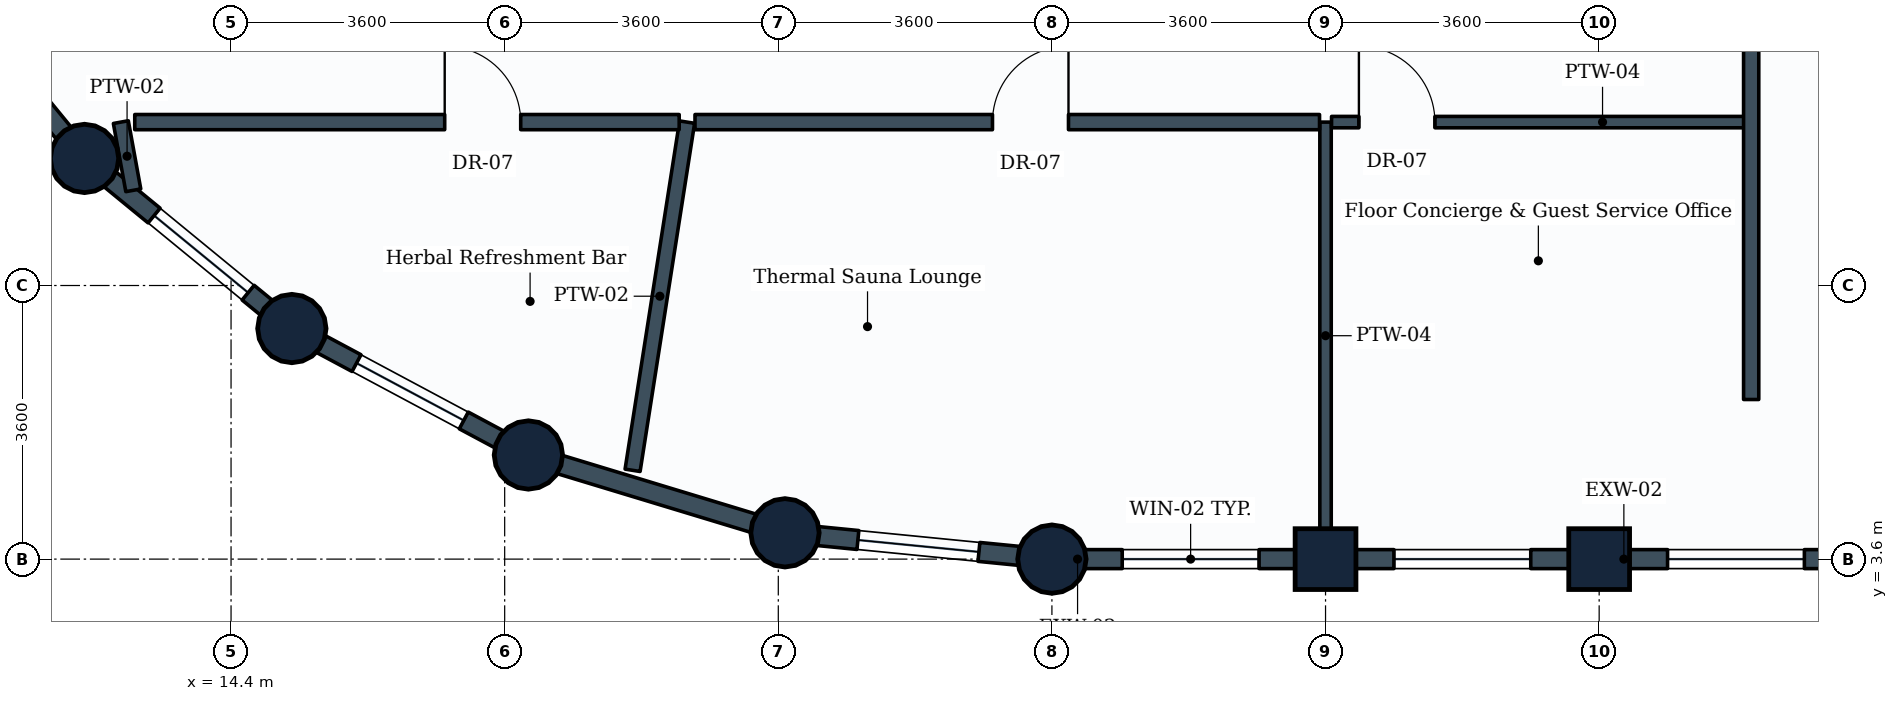
"""IFC4 building model, lengths in metres.
Left out: names, types, materials, properties, quantities, classifications, styles, units other than length and angle.
Written with IfcOpenShell. Run it as: python <this file> out.ifc"""

import sys

from ifc_helpers import new_model, si_unit, direction, frame, frame_2d, origin, origin_2d, place, context, subcontext, project, spatial, rectangle, circle, extrude, element, fill, save


model = new_model("IFC4")
c1 = context("Model", 3, precision=1e-05, world=origin(), true_north=direction((0.0, 1.0)))
c2 = subcontext(c1, "Body", "Model", "MODEL_VIEW")
j1 = project(units=[si_unit("LENGTHUNIT", "METRE"), si_unit("PLANEANGLEUNIT", "RADIAN")], contexts=[c1])
p1 = place(None, origin())
s1 = spatial("IfcSite", under=j1, at=p1, CompositionType="ELEMENT")
p2 = place(p1, origin())
s2 = spatial("IfcBuilding", under=s1, at=p2, CompositionType="ELEMENT")
p3 = place(p2, frame((0.0, 0.0, 242.6)))
s3 = spatial("IfcBuildingStorey", under=s2, at=p3, CompositionType="ELEMENT", Elevation=242.6)
for number, where, z_axis, x_axis in (
    (1, (12.472, 8.872, 0.0), (0.0, 0.0, 1.0), (1.0, 0.0, 0.0)),
    (2, (15.2, 6.634, 0.0), (0.0, 0.0, 1.0), (1.0, 0.0, 0.0)),
    (3, (18.312, 4.97, 0.0), (0.0, 0.0, 1.0), (1.0, 0.0, 0.0)),
    (4, (21.688, 3.946, 0.0), (0.0, 0.0, 1.0), (1.0, 0.0, 0.0)),
    (5, (25.2, 3.6, 0.0), (0.0, 0.0, 1.0), (1.0, 0.0, 0.0)),
):
    element("IfcColumn", number, at=place(p3, frame(where, z_axis=z_axis, x_axis=x_axis)), inside=s3, PredefinedType="COLUMN", context=c2, shape_type="SweptSolid", body=[
        extrude(circle(Radius=0.45, at=origin_2d()), origin(), (0.0, 0.0, 1.0), 3.6),
    ])
for number, where, z_axis, x_axis in (
    (6, (28.8, 3.6, 0.0), (0.0, 0.0, 1.0), (1.0, 0.0, 0.0)),
    (7, (32.4, 3.6, 0.0), (0.0, 0.0, 1.0), (1.0, 0.0, 0.0)),
):
    element("IfcColumn", number, at=place(p3, frame(where, z_axis=z_axis, x_axis=x_axis)), inside=s3, PredefinedType="COLUMN", context=c2, shape_type="SweptSolid", body=[
        extrude(rectangle(XDim=0.8, YDim=0.8, at=origin_2d()), origin(), (0.0, 0.0, 1.0), 3.6),
    ])
p4 = place(p3, frame((28.8, 3.6, 0.0), z_axis=(0.0, 0.0, 1.0), x_axis=(-1.0, 0.0, 0.0)))
e8 = element("IfcWall", 8, at=p4, inside=s3, PredefinedType="STANDARD", context=c2, shape_type="SweptSolid", body=[
    extrude(rectangle(XDim=3.6, YDim=0.25, at=frame_2d((1.8, 0.0))), origin(), (0.0, 0.0, 1.0), 2.83),
])
p5 = place(p4, frame((0.875, 0.0, 0.85)))
e9 = element("IfcOpeningElement", 9, at=p5, cuts=e8, PredefinedType="OPENING", context=c2, shape_type="SweptSolid", body=[
    extrude(rectangle(XDim=1.8, YDim=1.35, at=frame_2d((0.9, 0.675))), frame((0.0, 0.135, 0.0), z_axis=(0.0, -1.0, 0.0), x_axis=(1.0, 0.0, 0.0)), (0.0, 0.0, 1.0), 0.27),
])
p6 = place(p3, frame((32.4, 3.6, 0.0), z_axis=(0.0, 0.0, 1.0), x_axis=(-1.0, 0.0, 0.0)))
e10 = element("IfcWall", 10, at=p6, inside=s3, PredefinedType="STANDARD", context=c2, shape_type="SweptSolid", body=[
    extrude(rectangle(XDim=3.6, YDim=0.25, at=frame_2d((1.8, 0.0))), origin(), (0.0, 0.0, 1.0), 2.83),
])
p7 = place(p6, frame((0.9, 0.0, 0.85)))
e11 = element("IfcOpeningElement", 11, at=p7, cuts=e10, PredefinedType="OPENING", context=c2, shape_type="SweptSolid", body=[
    extrude(rectangle(XDim=1.8, YDim=1.35, at=frame_2d((0.9, 0.675))), frame((0.0, 0.135, 0.0), z_axis=(0.0, -1.0, 0.0), x_axis=(1.0, 0.0, 0.0)), (0.0, 0.0, 1.0), 0.27),
])
p8 = place(p3, frame((36.0, 3.6, 0.0), z_axis=(0.0, 0.0, 1.0), x_axis=(-1.0, 0.0, 0.0)))
e12 = element("IfcWall", 12, at=p8, inside=s3, PredefinedType="STANDARD", context=c2, shape_type="SweptSolid", body=[
    extrude(rectangle(XDim=3.6, YDim=0.25, at=frame_2d((1.8, 0.0))), origin(), (0.0, 0.0, 1.0), 2.83),
])
p9 = place(p8, frame((0.9, 0.0, 0.85)))
e13 = element("IfcOpeningElement", 13, at=p9, cuts=e12, PredefinedType="OPENING", context=c2, shape_type="SweptSolid", body=[
    extrude(rectangle(XDim=1.8, YDim=1.35, at=frame_2d((0.9, 0.675))), frame((0.0, 0.135, 0.0), z_axis=(0.0, -1.0, 0.0), x_axis=(1.0, 0.0, 0.0)), (0.0, 0.0, 1.0), 0.27),
])
p10 = place(p3, frame((12.472, 8.872, 0.0), z_axis=(0.0, 0.0, 1.0), x_axis=(-0.634258295121, 0.773121216285, 0.0)))
e14 = element("IfcWall", 14, at=p10, inside=s3, PredefinedType="STANDARD", context=c2, shape_type="SweptSolid", body=[
    extrude(rectangle(XDim=3.529, YDim=0.25, at=frame_2d((1.764, 0.0))), origin(), (0.0, 0.0, 1.0), 2.83),
])
p11 = place(p10, frame((0.964, 0.0, 0.85)))
e15 = element("IfcOpeningElement", 15, at=p11, cuts=e14, PredefinedType="OPENING", context=c2, shape_type="SweptSolid", body=[
    extrude(rectangle(XDim=1.6, YDim=1.35, at=frame_2d((0.8, 0.675))), frame((0.0, 0.135, 0.0), z_axis=(0.0, -1.0, 0.0), x_axis=(1.0, 0.0, 0.0)), (0.0, 0.0, 1.0), 0.27),
])
p12 = place(p3, frame((15.2, 6.634, 0.0), z_axis=(0.0, 0.0, 1.0), x_axis=(-0.773121216285, 0.634258295121, 0.0)))
e16 = element("IfcWall", 16, at=p12, inside=s3, PredefinedType="STANDARD", context=c2, shape_type="SweptSolid", body=[
    extrude(rectangle(XDim=3.529, YDim=0.25, at=frame_2d((1.764, 0.0))), origin(), (0.0, 0.0, 1.0), 2.83),
])
p13 = place(p12, frame((0.744, 0.0, 0.85)))
e17 = element("IfcOpeningElement", 17, at=p13, cuts=e16, PredefinedType="OPENING", context=c2, shape_type="SweptSolid", body=[
    extrude(rectangle(XDim=1.6, YDim=1.35, at=frame_2d((0.8, 0.675))), frame((0.0, 0.135, 0.0), z_axis=(0.0, -1.0, 0.0), x_axis=(1.0, 0.0, 0.0)), (0.0, 0.0, 1.0), 0.27),
])
p14 = place(p3, frame((18.312, 4.97, 0.0), z_axis=(0.0, 0.0, 1.0), x_axis=(-0.881846862014, 0.471535907389, 0.0)))
e18 = element("IfcWall", 18, at=p14, inside=s3, PredefinedType="STANDARD", context=c2, shape_type="SweptSolid", body=[
    extrude(rectangle(XDim=3.529, YDim=0.25, at=frame_2d((1.765, 0.0))), origin(), (0.0, 0.0, 1.0), 2.83),
])
p15 = place(p14, frame((0.964, 0.0, 0.85)))
e19 = element("IfcOpeningElement", 19, at=p15, cuts=e18, PredefinedType="OPENING", context=c2, shape_type="SweptSolid", body=[
    extrude(rectangle(XDim=1.6, YDim=1.35, at=frame_2d((0.8, 0.675))), frame((0.0, 0.135, 0.0), z_axis=(0.0, -1.0, 0.0), x_axis=(1.0, 0.0, 0.0)), (0.0, 0.0, 1.0), 0.27),
])
p16 = place(p3, frame((21.688, 3.946, 0.0), z_axis=(0.0, 0.0, 1.0), x_axis=(-0.956953367403, 0.290241714123, 0.0)))
e20 = element("IfcWall", 20, at=p16, inside=s3, PredefinedType="STANDARD", context=c2, shape_type="SweptSolid", body=[
    extrude(rectangle(XDim=3.528, YDim=0.25, at=frame_2d((1.764, 0.0))), origin(), (0.0, 0.0, 1.0), 2.83),
])
p17 = place(p3, frame((25.2, 3.6, 0.0), z_axis=(0.0, 0.0, 1.0), x_axis=(-0.995183369056, 0.098030923459, 0.0)))
e21 = element("IfcWall", 21, at=p17, inside=s3, PredefinedType="STANDARD", context=c2, shape_type="SweptSolid", body=[
    extrude(rectangle(XDim=3.529, YDim=0.25, at=frame_2d((1.765, 0.0))), origin(), (0.0, 0.0, 1.0), 2.83),
])
p18 = place(p17, frame((0.965, 0.0, 0.85)))
e22 = element("IfcOpeningElement", 22, at=p18, cuts=e21, PredefinedType="OPENING", context=c2, shape_type="SweptSolid", body=[
    extrude(rectangle(XDim=1.6, YDim=1.35, at=frame_2d((0.8, 0.675))), frame((0.0, 0.135, 0.0), z_axis=(0.0, -1.0, 0.0), x_axis=(1.0, 0.0, 0.0)), (0.0, 0.0, 1.0), 0.27),
])
p19 = place(p3, frame((28.8, 9.35, 0.0), z_axis=(0.0, 0.0, 1.0), x_axis=(0.0, -1.0, 0.0)))
e23 = element("IfcWall", 23, at=p19, inside=s3, PredefinedType="PARTITIONING", context=c2, shape_type="SweptSolid", body=[
    extrude(rectangle(XDim=5.621, YDim=0.15, at=frame_2d((2.811, 0.0))), origin(), (0.0, 0.0, 1.0), 3.335),
])
p20 = place(p3, frame((12.95, 9.35, 0.0), z_axis=(0.0, 0.0, 1.0), x_axis=(0.179827308786, -0.983698195086, 0.0)))
e24 = element("IfcWall", 24, at=p20, inside=s3, PredefinedType="PARTITIONING", context=c2, shape_type="SweptSolid", body=[
    extrude(rectangle(XDim=0.912, YDim=0.2, at=frame_2d((0.456, 0.0))), origin(), (0.0, 0.0, 1.0), 2.83),
])
p21 = place(p3, frame((20.4, 9.35, 0.0), z_axis=(0.0, 0.0, 1.0), x_axis=(-0.154564772307, -0.987982657318, 0.0)))
e25 = element("IfcWall", 25, at=p21, inside=s3, PredefinedType="PARTITIONING", context=c2, shape_type="SweptSolid", body=[
    extrude(rectangle(XDim=4.637, YDim=0.2, at=frame_2d((2.319, 0.0))), origin(), (0.0, 0.0, 1.0), 2.83),
])
p22 = place(p3, frame((13.133, 9.35, 0.0), z_axis=(0.0, 0.0, 1.0), x_axis=(1.0, 0.0, 0.0)))
e26 = element("IfcWall", 26, at=p22, inside=s3, PredefinedType="PARTITIONING", context=c2, shape_type="SweptSolid", body=[
    extrude(rectangle(XDim=7.163, YDim=0.2, at=frame_2d((3.582, 0.0))), origin(), (0.0, 0.0, 1.0), 3.02),
])
p23 = place(p22, frame((4.078, 0.0, 0.0)))
e27 = element("IfcOpeningElement", 27, at=p23, cuts=e26, PredefinedType="OPENING", context=c2, shape_type="SweptSolid", body=[
    extrude(rectangle(XDim=1.0, YDim=2.1, at=frame_2d((0.5, 1.05))), frame((0.0, 0.11, 0.0), z_axis=(0.0, -1.0, 0.0), x_axis=(1.0, 0.0, 0.0)), (0.0, 0.0, 1.0), 0.22),
])
p24 = place(p3, frame((20.504, 9.35, 0.0), z_axis=(0.0, 0.0, 1.0), x_axis=(1.0, 0.0, 0.0)))
e28 = element("IfcWall", 28, at=p24, inside=s3, PredefinedType="PARTITIONING", context=c2, shape_type="SweptSolid", body=[
    extrude(rectangle(XDim=8.217, YDim=0.2, at=frame_2d((4.108, 0.0))), origin(), (0.0, 0.0, 1.0), 3.02),
])
p25 = place(p24, frame((3.914, 0.0, 0.0)))
e29 = element("IfcOpeningElement", 29, at=p25, cuts=e28, PredefinedType="OPENING", context=c2, shape_type="SweptSolid", body=[
    extrude(rectangle(XDim=1.0, YDim=2.1, at=frame_2d((0.5, 1.05))), frame((0.0, 0.11, 0.0), z_axis=(0.0, -1.0, 0.0), x_axis=(1.0, 0.0, 0.0)), (0.0, 0.0, 1.0), 0.22),
])
p26 = place(p3, frame((28.879, 9.35, 0.0), z_axis=(0.0, 0.0, 1.0), x_axis=(1.0, 0.0, 0.0)))
e30 = element("IfcWall", 30, at=p26, inside=s3, PredefinedType="PARTITIONING", context=c2, shape_type="SweptSolid", body=[
    extrude(rectangle(XDim=5.521, YDim=0.15, at=frame_2d((2.76, 0.0))), origin(), (0.0, 0.0, 1.0), 3.335),
])
p27 = place(p26, frame((0.36, 0.0, 0.0)))
e31 = element("IfcOpeningElement", 31, at=p27, cuts=e30, PredefinedType="OPENING", context=c2, shape_type="SweptSolid", body=[
    extrude(rectangle(XDim=1.0, YDim=2.1, at=frame_2d((0.5, 1.05))), frame((0.0, 0.085, 0.0), z_axis=(0.0, -1.0, 0.0), x_axis=(1.0, 0.0, 0.0)), (0.0, 0.0, 1.0), 0.17),
])
p28 = place(p3, frame((34.4, 5.7, 0.0), z_axis=(0.0, 0.0, 1.0), x_axis=(0.0, 1.0, 0.0)))
e32 = element("IfcWall", 32, at=p28, inside=s3, PredefinedType="PARTITIONING", context=c2, shape_type="SweptSolid", body=[
    extrude(rectangle(XDim=12.15, YDim=0.2, at=frame_2d((6.075, 0.0))), origin(), (0.0, 0.0, 1.0), 3.03),
])
p29 = place(p5, origin())
e33 = element("IfcWindow", 33, at=p29, inside=s3, PartitioningType="SINGLE_PANEL", PredefinedType="WINDOW", context=c2, shape_type="SweptSolid", body=[
    extrude(rectangle(XDim=1.8, YDim=1.35, at=frame_2d((0.9, 0.675))), frame((0.0, 0.03, 0.0), z_axis=(0.0, -1.0, 0.0), x_axis=(1.0, 0.0, 0.0)), (0.0, 0.0, 1.0), 0.06),
])
fill(e9, e33)
p30 = place(p7, origin())
e34 = element("IfcWindow", 34, at=p30, inside=s3, PartitioningType="SINGLE_PANEL", PredefinedType="WINDOW", context=c2, shape_type="SweptSolid", body=[
    extrude(rectangle(XDim=1.8, YDim=1.35, at=frame_2d((0.9, 0.675))), frame((0.0, 0.03, 0.0), z_axis=(0.0, -1.0, 0.0), x_axis=(1.0, 0.0, 0.0)), (0.0, 0.0, 1.0), 0.06),
])
fill(e11, e34)
p31 = place(p9, origin())
e35 = element("IfcWindow", 35, at=p31, inside=s3, PartitioningType="SINGLE_PANEL", PredefinedType="WINDOW", context=c2, shape_type="SweptSolid", body=[
    extrude(rectangle(XDim=1.8, YDim=1.35, at=frame_2d((0.9, 0.675))), frame((0.0, 0.03, 0.0), z_axis=(0.0, -1.0, 0.0), x_axis=(1.0, 0.0, 0.0)), (0.0, 0.0, 1.0), 0.06),
])
fill(e13, e35)
p32 = place(p13, origin())
e36 = element("IfcWindow", 36, at=p32, inside=s3, PartitioningType="SINGLE_PANEL", PredefinedType="WINDOW", context=c2, shape_type="SweptSolid", body=[
    extrude(rectangle(XDim=1.6, YDim=1.35, at=frame_2d((0.8, 0.675))), frame((0.0, 0.03, 0.0), z_axis=(0.0, -1.0, 0.0), x_axis=(1.0, 0.0, 0.0)), (0.0, 0.0, 1.0), 0.06),
])
fill(e17, e36)
p33 = place(p15, origin())
e37 = element("IfcWindow", 37, at=p33, inside=s3, PartitioningType="SINGLE_PANEL", PredefinedType="WINDOW", context=c2, shape_type="SweptSolid", body=[
    extrude(rectangle(XDim=1.6, YDim=1.35, at=frame_2d((0.8, 0.675))), frame((0.0, 0.03, 0.0), z_axis=(0.0, -1.0, 0.0), x_axis=(1.0, 0.0, 0.0)), (0.0, 0.0, 1.0), 0.06),
])
fill(e19, e37)
p34 = place(p18, origin())
e38 = element("IfcWindow", 38, at=p34, inside=s3, PartitioningType="SINGLE_PANEL", PredefinedType="WINDOW", context=c2, shape_type="SweptSolid", body=[
    extrude(rectangle(XDim=1.6, YDim=1.35, at=frame_2d((0.8, 0.675))), frame((0.0, 0.03, 0.0), z_axis=(0.0, -1.0, 0.0), x_axis=(1.0, 0.0, 0.0)), (0.0, 0.0, 1.0), 0.06),
])
fill(e22, e38)
p35 = place(p23, origin())
e39 = element("IfcDoor", 39, at=p35, inside=s3, OperationType="SINGLE_SWING_LEFT", PredefinedType="DOOR", context=c2, shape_type="SweptSolid", body=[
    extrude(rectangle(XDim=1.0, YDim=2.1, at=frame_2d((0.5, 1.05))), frame((0.0, 0.025, 0.0), z_axis=(0.0, -1.0, 0.0), x_axis=(1.0, 0.0, 0.0)), (0.0, 0.0, 1.0), 0.05),
])
fill(e27, e39)
p36 = place(p25, origin())
e40 = element("IfcDoor", 40, at=p36, inside=s3, OperationType="SINGLE_SWING_RIGHT", PredefinedType="DOOR", context=c2, shape_type="SweptSolid", body=[
    extrude(rectangle(XDim=1.0, YDim=2.1, at=frame_2d((0.5, 1.05))), frame((0.0, 0.025, 0.0), z_axis=(0.0, -1.0, 0.0), x_axis=(1.0, 0.0, 0.0)), (0.0, 0.0, 1.0), 0.05),
])
fill(e29, e40)
p37 = place(p27, origin())
e41 = element("IfcDoor", 41, at=p37, inside=s3, OperationType="SINGLE_SWING_LEFT", PredefinedType="DOOR", context=c2, shape_type="SweptSolid", body=[
    extrude(rectangle(XDim=1.0, YDim=2.1, at=frame_2d((0.5, 1.05))), frame((0.0, 0.025, 0.0), z_axis=(0.0, -1.0, 0.0), x_axis=(1.0, 0.0, 0.0)), (0.0, 0.0, 1.0), 0.05),
])
fill(e31, e41)
save(model, sys.argv[1])
